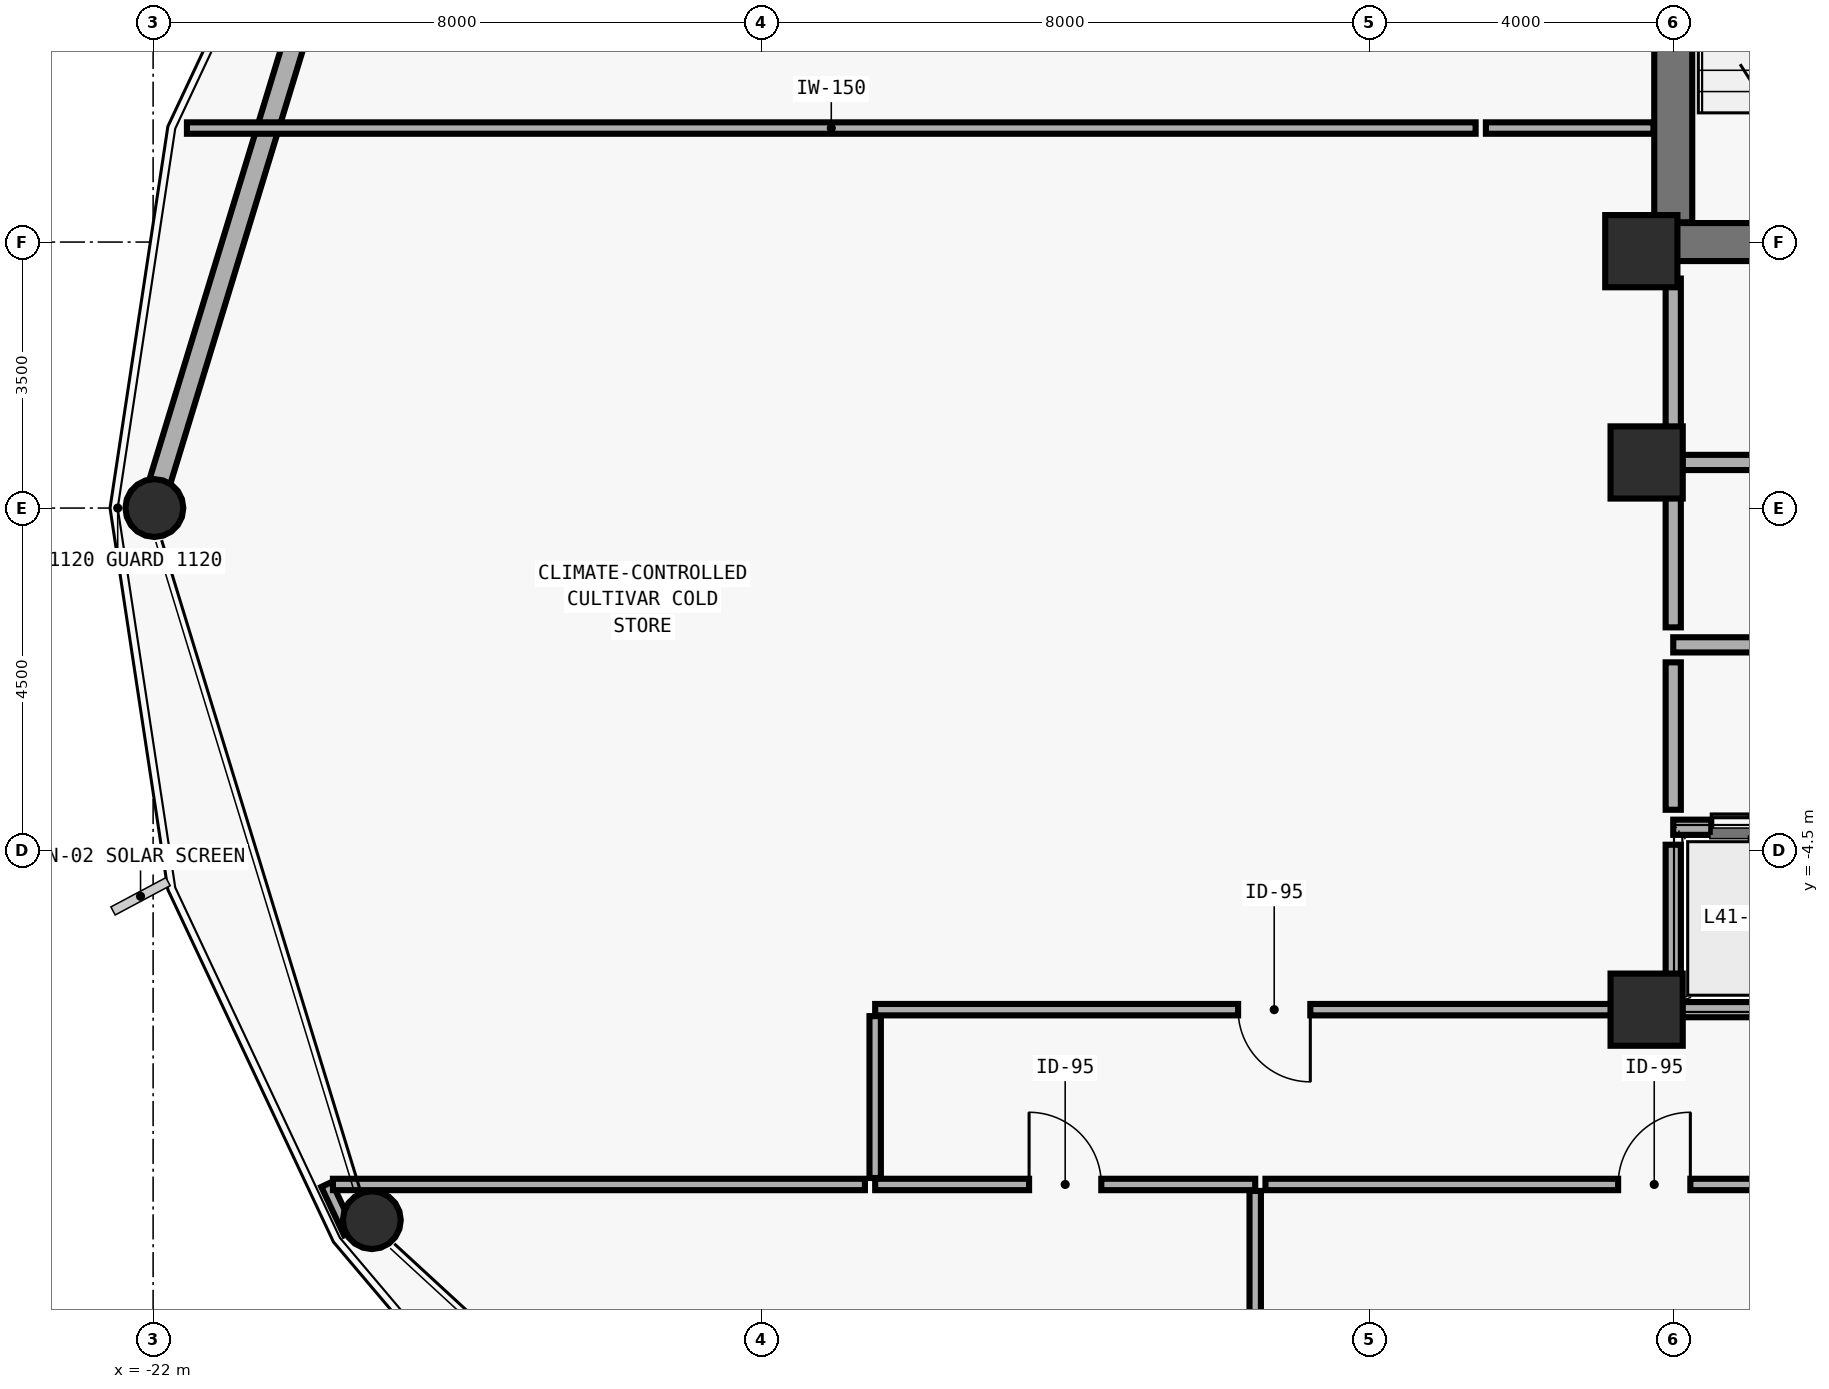
"""IFC4 building model, lengths in metres.
Left out: names, types, materials, properties, quantities, classifications, styles, units other than length and angle.
Written with IfcOpenShell. Run it as: python <this file> out.ifc"""

import sys

from ifc_helpers import new_model, si_unit, direction, frame, frame_2d, origin, origin_2d, place, context, subcontext, project, spatial, rectangle, hollow_circle, extrude, element, fill, save


model = new_model("IFC4")
c1 = context("Model", 3, precision=1e-05, world=origin(), true_north=direction((0.0, 1.0)))
c2 = subcontext(c1, "Body", "Model", "MODEL_VIEW")
j1 = project(units=[si_unit("LENGTHUNIT", "METRE"), si_unit("PLANEANGLEUNIT", "RADIAN")], contexts=[c1])
p1 = place(None, origin())
s1 = spatial("IfcSite", under=j1, at=p1, CompositionType="ELEMENT")
p2 = place(p1, origin())
s2 = spatial("IfcBuilding", under=s1, at=p2, CompositionType="ELEMENT")
p3 = place(p2, frame((0.0, 0.0, 165.6)))
s3 = spatial("IfcBuildingStorey", under=s2, at=p3, CompositionType="ELEMENT", Elevation=165.6)
p4 = place(p3, frame((-2.0, 3.5, 0.0), z_axis=(0.0, 0.0, 1.0), x_axis=(1.0, 0.0, 0.0)))
e1 = element("IfcWall", 1, at=p4, inside=s3, PredefinedType="SHEAR", context=c2, shape_type="SweptSolid", body=[
    extrude(rectangle(XDim=10.0, YDim=0.5, at=frame_2d((5.0, 0.0))), origin(), (0.0, 0.0, 1.0), 3.892),
])
p5 = place(p4, frame((1.65, 0.0, 0.0)))
e2 = element("IfcOpeningElement", 2, at=p5, cuts=e1, PredefinedType="OPENING", context=c2, shape_type="SweptSolid", body=[
    extrude(rectangle(XDim=1.1, YDim=2.15, at=frame_2d((0.55, 1.075))), frame((0.0, 0.26, 0.0), z_axis=(0.0, -1.0, 0.0), x_axis=(1.0, 0.0, 0.0)), (0.0, 0.0, 1.0), 0.52),
])
p6 = place(p4, frame((7.65, 0.0, 0.0)))
e3 = element("IfcOpeningElement", 3, at=p6, cuts=e1, PredefinedType="OPENING", context=c2, shape_type="SweptSolid", body=[
    extrude(rectangle(XDim=1.1, YDim=2.15, at=frame_2d((0.55, 1.075))), frame((0.0, 0.26, 0.0), z_axis=(0.0, -1.0, 0.0), x_axis=(1.0, 0.0, 0.0)), (0.0, 0.0, 1.0), 0.52),
])
p7 = place(p4, frame((3.72, 0.0, 0.0)))
e4 = element("IfcOpeningElement", 4, at=p7, cuts=e1, PredefinedType="OPENING", context=c2, shape_type="SweptSolid", body=[
    extrude(rectangle(XDim=1.1, YDim=2.2, at=frame_2d((0.55, 1.1))), frame((0.0, 0.26, 0.0), z_axis=(0.0, -1.0, 0.0), x_axis=(1.0, 0.0, 0.0)), (0.0, 0.0, 1.0), 0.52),
])
p8 = place(p4, frame((5.18, 0.0, 0.0)))
e5 = element("IfcOpeningElement", 5, at=p8, cuts=e1, PredefinedType="OPENING", context=c2, shape_type="SweptSolid", body=[
    extrude(rectangle(XDim=1.1, YDim=2.2, at=frame_2d((0.55, 1.1))), frame((0.0, 0.26, 0.0), z_axis=(0.0, -1.0, 0.0), x_axis=(1.0, 0.0, 0.0)), (0.0, 0.0, 1.0), 0.52),
])
p9 = place(p3, frame((-2.0, 3.76, 0.0), z_axis=(0.0, 0.0, 1.0), x_axis=(0.0, 1.0, 0.0)))
e6 = element("IfcWall", 6, at=p9, inside=s3, PredefinedType="SHEAR", context=c2, shape_type="SweptSolid", body=[
    extrude(rectangle(XDim=8.48, YDim=0.5, at=frame_2d((4.24, 0.0))), origin(), (0.0, 0.0, 1.0), 3.892),
])
for number, where, z_axis, x_axis in (
    (7, (-2.42, 3.38, 0.0), (0.0, 0.0, 1.0), (1.0, 0.0, 0.0)),
    (8, (-2.35, 0.6, 0.0), (0.0, 0.0, 1.0), (1.0, 0.0, 0.0)),
    (9, (-2.35, -6.6, 0.0), (0.0, 0.0, 1.0), (1.0, 0.0, 0.0)),
):
    element("IfcColumn", number, at=place(p3, frame(where, z_axis=z_axis, x_axis=x_axis)), inside=s3, PredefinedType="COLUMN", context=c2, shape_type="SweptSolid", body=[
        extrude(rectangle(XDim=0.95, YDim=0.95, at=origin_2d()), origin(), (0.0, 0.0, 1.0), 3.875),
    ])
p10 = place(p3, frame((-22.017, 0.0, 0.0), z_axis=(0.019457075977, 0.0, 0.999810693179), x_axis=(0.0, 1.0, 0.0)))
e10 = element("IfcColumn", 10, at=p10, inside=s3, PredefinedType="COLUMN", context=c2, shape_type="SweptSolid", body=[
    extrude(hollow_circle(Radius=0.381, WallThickness=0.028, at=origin_2d()), origin(), (0.0, 0.0, 1.0), 3.451),
])
p11 = place(p3, frame((-19.151, -9.382, 0.0), z_axis=(0.016839601781, 0.007004708304, 0.999833667103), x_axis=(-0.384064389966, 0.923306311232, 0.0)))
e11 = element("IfcColumn", 11, at=p11, inside=s3, PredefinedType="COLUMN", context=c2, shape_type="SweptSolid", body=[
    extrude(hollow_circle(Radius=0.381, WallThickness=0.028, at=origin_2d()), origin(), (0.0, 0.0, 1.0), 3.45),
])
p12 = place(p3, frame((-21.919, 0.321, 0.0), z_axis=(0.0, 0.0, 1.0), x_axis=(0.292111961986, 0.956384128719, 0.0)))
e12 = element("IfcWall", 12, at=p12, inside=s3, PredefinedType="SOLIDWALL", context=c2, shape_type="SweptSolid", body=[
    extrude(rectangle(XDim=9.137, YDim=0.28, at=frame_2d((4.569, 0.0))), origin(), (0.0, 0.0, 1.0), 2.97),
])
p13 = place(p3, frame((-2.0, -4.2, 0.0), z_axis=(0.0, 0.0, 1.0), x_axis=(1.0, 0.0, 0.0)))
e13 = element("IfcWall", 13, at=p13, inside=s3, PredefinedType="SOLIDWALL", context=c2, shape_type="SweptSolid", body=[
    extrude(rectangle(XDim=6.0, YDim=0.2, at=frame_2d((3.0, 0.0))), origin(), (0.0, 0.0, 1.0), 3.45),
])
p14 = place(p13, frame((0.5, 0.0, 0.0)))
e14 = element("IfcOpeningElement", 14, at=p14, cuts=e13, PredefinedType="OPENING", context=c2, shape_type="SweptSolid", body=[
    extrude(rectangle(XDim=1.0, YDim=2.2, at=frame_2d((0.5, 1.1))), frame((0.0, 0.11, 0.0), z_axis=(0.0, -1.0, 0.0), x_axis=(1.0, 0.0, 0.0)), (0.0, 0.0, 1.0), 0.22),
])
p15 = place(p13, frame((2.45, 0.0, 0.0)))
e15 = element("IfcOpeningElement", 15, at=p15, cuts=e13, PredefinedType="OPENING", context=c2, shape_type="SweptSolid", body=[
    extrude(rectangle(XDim=1.0, YDim=2.2, at=frame_2d((0.5, 1.1))), frame((0.0, 0.11, 0.0), z_axis=(0.0, -1.0, 0.0), x_axis=(1.0, 0.0, 0.0)), (0.0, 0.0, 1.0), 0.22),
])
p16 = place(p13, frame((4.4, 0.0, 0.0)))
e16 = element("IfcOpeningElement", 16, at=p16, cuts=e13, PredefinedType="OPENING", context=c2, shape_type="SweptSolid", body=[
    extrude(rectangle(XDim=1.0, YDim=2.2, at=frame_2d((0.5, 1.1))), frame((0.0, 0.11, 0.0), z_axis=(0.0, -1.0, 0.0), x_axis=(1.0, 0.0, 0.0)), (0.0, 0.0, 1.0), 0.22),
])
p17 = place(p3, frame((-2.0, -6.6, 0.0), z_axis=(0.0, 0.0, 1.0), x_axis=(1.0, 0.0, 0.0)))
e17 = element("IfcWall", 17, at=p17, inside=s3, PredefinedType="SOLIDWALL", context=c2, shape_type="SweptSolid", body=[
    extrude(rectangle(XDim=6.0, YDim=0.2, at=frame_2d((3.0, 0.0))), origin(), (0.0, 0.0, 1.0), 3.032),
])
p18 = place(p3, frame((-2.0, -6.37, 0.0), z_axis=(0.0, 0.0, 1.0), x_axis=(0.0, 1.0, 0.0)))
e18 = element("IfcWall", 18, at=p18, inside=s3, PredefinedType="SOLIDWALL", context=c2, shape_type="SweptSolid", body=[
    extrude(rectangle(XDim=1.94, YDim=0.2, at=frame_2d((0.97, 0.0))), origin(), (0.0, 0.0, 1.0), 3.032),
])
p19 = place(p3, frame((-2.0, -1.8, 0.0), z_axis=(0.0, 0.0, 1.0), x_axis=(1.0, 0.0, 0.0)))
e19 = element("IfcWall", 19, at=p19, inside=s3, PredefinedType="MOVABLE", context=c2, shape_type="SweptSolid", body=[
    extrude(rectangle(XDim=5.84, YDim=0.2, at=frame_2d((2.92, 0.0))), origin(), (0.0, 0.0, 1.0), 3.45),
])
p20 = place(p19, frame((1.15, 0.0, 0.0)))
e20 = element("IfcOpeningElement", 20, at=p20, cuts=e19, PredefinedType="OPENING", context=c2, shape_type="SweptSolid", body=[
    extrude(rectangle(XDim=0.85, YDim=2.1, at=frame_2d((0.425, 1.05))), frame((0.0, 0.11, 0.0), z_axis=(0.0, -1.0, 0.0), x_axis=(1.0, 0.0, 0.0)), (0.0, 0.0, 1.0), 0.22),
])
p21 = place(p19, frame((4.2, 0.0, 0.0)))
e21 = element("IfcOpeningElement", 21, at=p21, cuts=e19, PredefinedType="OPENING", context=c2, shape_type="SweptSolid", body=[
    extrude(rectangle(XDim=0.85, YDim=2.1, at=frame_2d((0.425, 1.05))), frame((0.0, 0.11, 0.0), z_axis=(0.0, -1.0, 0.0), x_axis=(1.0, 0.0, 0.0)), (0.0, 0.0, 1.0), 0.22),
])
p22 = place(p3, frame((-12.5, -8.9, 0.0), z_axis=(0.0, 0.0, 1.0), x_axis=(1.0, 0.0, 0.0)))
e22 = element("IfcWall", 22, at=p22, inside=s3, PredefinedType="PARTITIONING", context=c2, shape_type="SweptSolid", body=[
    extrude(rectangle(XDim=5.0, YDim=0.15, at=frame_2d((2.5, 0.0))), origin(), (0.0, 0.0, 1.0), 2.882),
])
p23 = place(p22, frame((2.025, 0.0, 0.0)))
e23 = element("IfcOpeningElement", 23, at=p23, cuts=e22, PredefinedType="OPENING", context=c2, shape_type="SweptSolid", body=[
    extrude(rectangle(XDim=0.95, YDim=2.1, at=frame_2d((0.475, 1.05))), frame((0.0, 0.085, 0.0), z_axis=(0.0, -1.0, 0.0), x_axis=(1.0, 0.0, 0.0)), (0.0, 0.0, 1.0), 0.17),
])
p24 = place(p3, frame((-7.365, -8.9, 0.0), z_axis=(0.0, 0.0, 1.0), x_axis=(1.0, 0.0, 0.0)))
e24 = element("IfcWall", 24, at=p24, inside=s3, PredefinedType="PARTITIONING", context=c2, shape_type="SweptSolid", body=[
    extrude(rectangle(XDim=10.365, YDim=0.15, at=frame_2d((5.183, 0.0))), origin(), (0.0, 0.0, 1.0), 3.45),
])
p25 = place(p24, frame((4.64, 0.0, 0.0)))
e25 = element("IfcOpeningElement", 25, at=p25, cuts=e24, PredefinedType="OPENING", context=c2, shape_type="SweptSolid", body=[
    extrude(rectangle(XDim=0.95, YDim=2.1, at=frame_2d((0.475, 1.05))), frame((0.0, 0.085, 0.0), z_axis=(0.0, -1.0, 0.0), x_axis=(1.0, 0.0, 0.0)), (0.0, 0.0, 1.0), 0.17),
])
p26 = place(p3, frame((-2.16, -6.6, 0.0), z_axis=(0.0, 0.0, 1.0), x_axis=(-1.0, 0.0, 0.0)))
e26 = element("IfcWall", 26, at=p26, inside=s3, PredefinedType="PARTITIONING", context=c2, shape_type="SweptSolid", body=[
    extrude(rectangle(XDim=10.34, YDim=0.15, at=frame_2d((5.17, 0.0))), origin(), (0.0, 0.0, 1.0), 2.882),
])
p27 = place(p26, frame((4.615, 0.0, 0.0)))
e27 = element("IfcOpeningElement", 27, at=p27, cuts=e26, PredefinedType="OPENING", context=c2, shape_type="SweptSolid", body=[
    extrude(rectangle(XDim=0.95, YDim=2.1, at=frame_2d((0.475, 1.05))), frame((0.0, 0.085, 0.0), z_axis=(0.0, -1.0, 0.0), x_axis=(1.0, 0.0, 0.0)), (0.0, 0.0, 1.0), 0.17),
])
p28 = place(p3, frame((-1.88, 0.6, 0.0), z_axis=(0.0, 0.0, 1.0), x_axis=(1.0, 0.0, 0.0)))
e28 = element("IfcWall", 28, at=p28, inside=s3, PredefinedType="MOVABLE", context=c2, shape_type="SweptSolid", body=[
    extrude(rectangle(XDim=5.72, YDim=0.2, at=frame_2d((2.86, 0.0))), origin(), (0.0, 0.0, 1.0), 3.032),
])
p29 = place(p3, frame((-2.0, 0.72, 0.0), z_axis=(0.0, 0.0, 1.0), x_axis=(0.0, 1.0, 0.0)))
e29 = element("IfcWall", 29, at=p29, inside=s3, PredefinedType="MOVABLE", context=c2, shape_type="SweptSolid", body=[
    extrude(rectangle(XDim=2.3, YDim=0.2, at=frame_2d((1.15, 0.0))), origin(), (0.0, 0.0, 1.0), 2.782),
])
p30 = place(p3, frame((-2.0, -3.97, 0.0), z_axis=(0.0, 0.0, 1.0), x_axis=(0.0, 1.0, 0.0)))
e30 = element("IfcWall", 30, at=p30, inside=s3, PredefinedType="MOVABLE", context=c2, shape_type="SweptSolid", body=[
    extrude(rectangle(XDim=1.94, YDim=0.2, at=frame_2d((0.97, 0.0))), origin(), (0.0, 0.0, 1.0), 3.032),
])
p31 = place(p3, frame((-2.0, -1.57, 0.0), z_axis=(0.0, 0.0, 1.0), x_axis=(0.0, 1.0, 0.0)))
e31 = element("IfcWall", 31, at=p31, inside=s3, PredefinedType="MOVABLE", context=c2, shape_type="SweptSolid", body=[
    extrude(rectangle(XDim=2.05, YDim=0.2, at=frame_2d((1.025, 0.0))), origin(), (0.0, 0.0, 1.0), 3.032),
])
p32 = place(p3, frame((-7.5, -8.985, 0.0), z_axis=(0.0, 0.0, 1.0), x_axis=(0.0, -1.0, 0.0)))
e32 = element("IfcWall", 32, at=p32, inside=s3, PredefinedType="PARTITIONING", context=c2, shape_type="SweptSolid", body=[
    extrude(rectangle(XDim=9.276, YDim=0.15, at=frame_2d((4.638, 0.0))), origin(), (0.0, 0.0, 1.0), 3.45),
])
p33 = place(p3, frame((-19.42, -9.537, 0.0), z_axis=(0.0, 0.0, 1.0), x_axis=(-0.424878134875, 0.905250556755, 0.0)))
e33 = element("IfcWall", 33, at=p33, inside=s3, PredefinedType="PARTITIONING", context=c2, shape_type="SweptSolid", body=[
    extrude(rectangle(XDim=0.704, YDim=0.15, at=frame_2d((0.352, 0.0))), origin(), (0.0, 0.0, 1.0), 2.982),
])
p34 = place(p3, frame((-19.634, -8.9, 0.0), z_axis=(0.0, 0.0, 1.0), x_axis=(1.0, 0.0, 0.0)))
e34 = element("IfcWall", 34, at=p34, inside=s3, PredefinedType="PARTITIONING", context=c2, shape_type="SweptSolid", body=[
    extrude(rectangle(XDim=6.999, YDim=0.15, at=frame_2d((3.5, 0.0))), origin(), (0.0, 0.0, 1.0), 2.882),
])
p35 = place(p3, frame((-12.5, -6.685, 0.0), z_axis=(0.0, 0.0, 1.0), x_axis=(0.0, -1.0, 0.0)))
e35 = element("IfcWall", 35, at=p35, inside=s3, PredefinedType="PARTITIONING", context=c2, shape_type="SweptSolid", body=[
    extrude(rectangle(XDim=2.13, YDim=0.15, at=frame_2d((1.065, 0.0))), origin(), (0.0, 0.0, 1.0), 3.45),
])
p36 = place(p3, frame((-21.555, 5.0, 0.0), z_axis=(0.0, 0.0, 1.0), x_axis=(1.0, 0.0, 0.0)))
e36 = element("IfcWall", 36, at=p36, inside=s3, PredefinedType="PARTITIONING", context=c2, shape_type="SweptSolid", body=[
    extrude(rectangle(XDim=16.955, YDim=0.15, at=frame_2d((8.478, 0.0))), origin(), (0.0, 0.0, 1.0), 3.45),
])
p37 = place(p3, frame((-4.465, 5.0, 0.0), z_axis=(0.0, 0.0, 1.0), x_axis=(1.0, 0.0, 0.0)))
e37 = element("IfcWall", 37, at=p37, inside=s3, PredefinedType="PARTITIONING", context=c2, shape_type="SweptSolid", body=[
    extrude(rectangle(XDim=2.205, YDim=0.15, at=frame_2d((1.103, 0.0))), origin(), (0.0, 0.0, 1.0), 3.45),
])
p38 = place(p23, origin())
e38 = element("IfcDoor", 38, at=p38, inside=s3, OperationType="SINGLE_SWING_LEFT", PredefinedType="DOOR", context=c2, shape_type="SweptSolid", body=[
    extrude(rectangle(XDim=0.95, YDim=2.1, at=frame_2d((0.475, 1.05))), frame((0.0, 0.025, 0.0), z_axis=(0.0, -1.0, 0.0), x_axis=(1.0, 0.0, 0.0)), (0.0, 0.0, 1.0), 0.05),
])
fill(e23, e38)
p39 = place(p25, origin())
e39 = element("IfcDoor", 39, at=p39, inside=s3, OperationType="SINGLE_SWING_RIGHT", PredefinedType="DOOR", context=c2, shape_type="SweptSolid", body=[
    extrude(rectangle(XDim=0.95, YDim=2.1, at=frame_2d((0.475, 1.05))), frame((0.0, 0.025, 0.0), z_axis=(0.0, -1.0, 0.0), x_axis=(1.0, 0.0, 0.0)), (0.0, 0.0, 1.0), 0.05),
])
fill(e25, e39)
p40 = place(p27, origin())
e40 = element("IfcDoor", 40, at=p40, inside=s3, OperationType="SINGLE_SWING_LEFT", PredefinedType="DOOR", context=c2, shape_type="SweptSolid", body=[
    extrude(rectangle(XDim=0.95, YDim=2.1, at=frame_2d((0.475, 1.05))), frame((0.0, 0.025, 0.0), z_axis=(0.0, -1.0, 0.0), x_axis=(1.0, 0.0, 0.0)), (0.0, 0.0, 1.0), 0.05),
])
fill(e27, e40)
p41 = place(p14, origin())
e41 = element("IfcDoor", 41, at=p41, inside=s3, OperationType="DOUBLE_DOOR_SLIDING", PredefinedType="DOOR", context=c2, shape_type="SweptSolid", body=[
    extrude(rectangle(XDim=1.0, YDim=2.2, at=frame_2d((0.5, 1.1))), frame((0.0, 0.025, 0.0), z_axis=(0.0, -1.0, 0.0), x_axis=(1.0, 0.0, 0.0)), (0.0, 0.0, 1.0), 0.05),
])
fill(e14, e41)
save(model, sys.argv[1])
